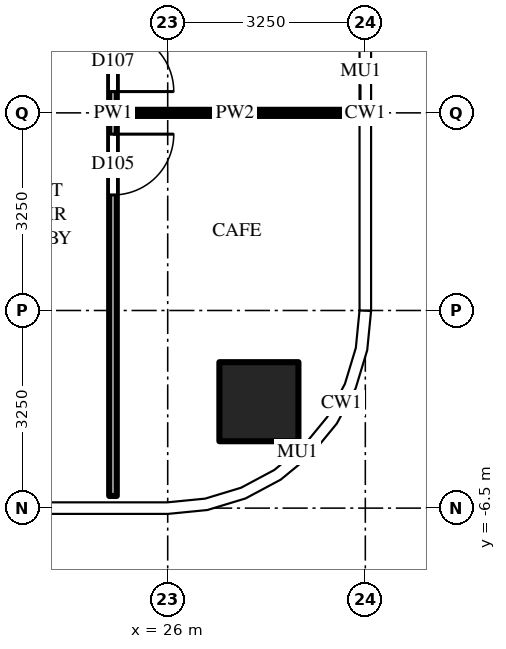
"""IFC4 building model, lengths in metres.
Left out: names, types, materials, properties, quantities, classifications, styles, units other than length and angle.
Written with IfcOpenShell. Run it as: python <this file> out.ifc"""

import sys

from ifc_helpers import new_model, si_unit, direction, frame, frame_2d, origin, origin_2d, place, context, subcontext, project, spatial, rectangle, extrude, source, transform, mapped, element, fill, save


model = new_model("IFC4")
c1 = context("Model", 3, precision=1e-05, world=origin(), true_north=direction((0.0, 1.0)))
c2 = subcontext(c1, "Body", "Model", "MODEL_VIEW")
j1 = project(units=[si_unit("LENGTHUNIT", "METRE"), si_unit("PLANEANGLEUNIT", "RADIAN")], contexts=[c1])
p1 = place(None, origin())
s1 = spatial("IfcSite", under=j1, at=p1, CompositionType="ELEMENT")
p2 = place(p1, origin())
s2 = spatial("IfcBuilding", under=s1, at=p2, CompositionType="ELEMENT")
p3 = place(p2, frame((0.0, 0.0, 106.5)))
s3 = spatial("IfcBuildingStorey", under=s2, at=p3, CompositionType="ELEMENT", Elevation=106.5)
m1 = source(origin(), c2, "Body", "SweptSolid", [
    extrude(rectangle(XDim=1.3, YDim=1.3, at=origin_2d()), origin(), (0.0, 0.0, 1.0), 4.5),
])
p4 = place(p3, frame((27.5, -4.75, 0.0), z_axis=(0.0, 0.0, 1.0), x_axis=(1.0, 0.0, 0.0)))
e1 = element("IfcColumn", 1, at=p4, inside=s3, PredefinedType="COLUMN", context=c2, shape_type="MappedRepresentation", body=[
    mapped(m1, transform((0.0, 0.0, 0.0))),
])
m2 = source(origin(), c2, "Body", "SweptSolid", [
    extrude(rectangle(XDim=12.6, YDim=0.125, at=frame_2d((6.3, 0.0))), origin(), (0.0, 0.0, 1.0), 3.33),
])
p5 = place(p3, frame((25.1, 6.3, 0.0), z_axis=(0.0, 0.0, 1.0), x_axis=(0.0, -1.0, 0.0)))
e2 = element("IfcWall", 2, at=p5, inside=s3, PredefinedType="PARTITIONING", context=c2, shape_type="MappedRepresentation", body=[
    mapped(m2, transform((0.0, 0.0, 0.0))),
])
m3 = source(origin(), c2, "Body", "SweptSolid", [
    extrude(rectangle(XDim=1.0, YDim=2.1, at=frame_2d((0.5, 1.05))), frame((0.0, 0.073, 0.0), z_axis=(0.0, -1.0, 0.0), x_axis=(1.0, 0.0, 0.0)), (0.0, 0.0, 1.0), 0.145),
])
p6 = place(p5, frame((6.65, 0.0, 0.0)))
e3 = element("IfcOpeningElement", 3, at=p6, cuts=e2, PredefinedType="OPENING", context=c2, shape_type="MappedRepresentation", body=[
    mapped(m3, transform((0.0, 0.0, 0.0))),
])
p7 = place(p5, frame((4.95, 0.0, 0.0)))
e4 = element("IfcOpeningElement", 4, at=p7, cuts=e2, PredefinedType="OPENING", context=c2, shape_type="MappedRepresentation", body=[
    mapped(m3, transform((0.0, 0.0, 0.0))),
])
m4 = source(origin(), c2, "Body", "SweptSolid", [
    extrude(rectangle(XDim=3.887, YDim=0.1, at=frame_2d((1.944, 0.0))), origin(), (0.0, 0.0, 1.0), 3.33),
])
p8 = place(p3, frame((25.163, 0.0, 0.0), z_axis=(0.0, 0.0, 1.0), x_axis=(1.0, 0.0, 0.0)))
e5 = element("IfcWall", 5, at=p8, inside=s3, PredefinedType="PARTITIONING", context=c2, shape_type="MappedRepresentation", body=[
    mapped(m4, transform((0.0, 0.0, 0.0))),
])
m5 = source(origin(), c2, "Body", "SweptSolid", [
    extrude(rectangle(XDim=1.0, YDim=2.1, at=frame_2d((0.5, 1.05))), frame((0.0, 0.025, 0.0), z_axis=(0.0, -1.0, 0.0), x_axis=(1.0, 0.0, 0.0)), (0.0, 0.0, 1.0), 0.05),
])
p9 = place(p6, origin())
e6 = element("IfcDoor", 6, at=p9, inside=s3, OperationType="SINGLE_SWING_LEFT", PredefinedType="DOOR", context=c2, shape_type="MappedRepresentation", body=[
    mapped(m5, transform((0.0, 0.0, 0.0))),
])
fill(e3, e6)
p10 = place(p7, origin())
e7 = element("IfcDoor", 7, at=p10, inside=s3, OperationType="SINGLE_SWING_RIGHT", PredefinedType="DOOR", context=c2, shape_type="MappedRepresentation", body=[
    mapped(m5, transform((0.0, 0.0, 0.0))),
])
fill(e4, e7)
save(model, sys.argv[1])
